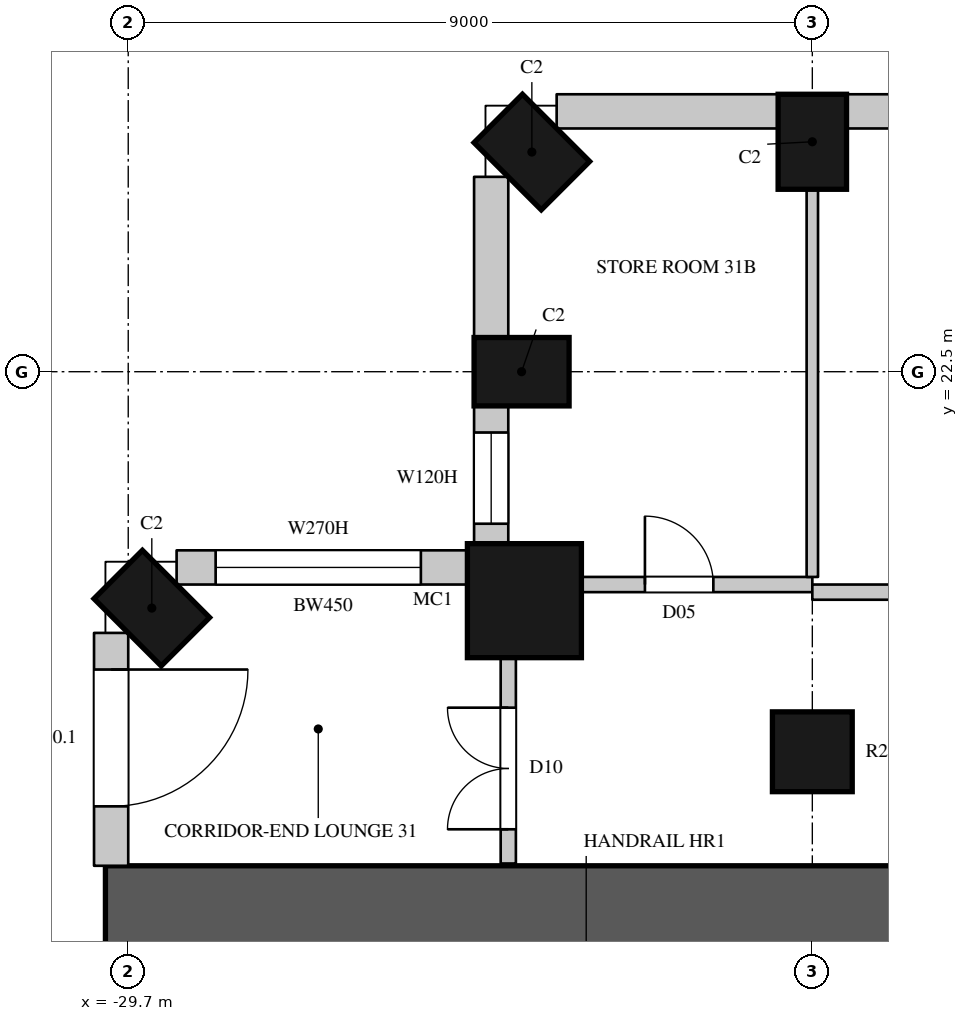
"""IFC4 building model, lengths in metres.
Left out: names, types, materials, properties, quantities, classifications, styles, units other than length and angle.
Written with IfcOpenShell. Run it as: python <this file> out.ifc"""

import sys

from ifc_helpers import new_model, si_unit, direction, frame, frame_2d, origin, origin_2d, place, context, subcontext, project, spatial, rectangle, circle, extrude, element, fill, save


model = new_model("IFC4")
c1 = context("Model", 3, precision=1e-05, world=origin(), true_north=direction((0.0, 1.0)))
c2 = subcontext(c1, "Body", "Model", "MODEL_VIEW")
j1 = project(units=[si_unit("LENGTHUNIT", "METRE"), si_unit("PLANEANGLEUNIT", "RADIAN")], contexts=[c1])
p1 = place(None, origin())
s1 = spatial("IfcSite", under=j1, at=p1, CompositionType="ELEMENT")
p2 = place(p1, origin())
s2 = spatial("IfcBuilding", under=s1, at=p2, CompositionType="ELEMENT")
p3 = place(p2, frame((0.0, 0.0, 141.9)))
s3 = spatial("IfcBuildingStorey", under=s2, at=p3, CompositionType="ELEMENT", Elevation=141.9)
for number, where, z_axis, x_axis in (
    (1, (-29.39, 19.39, 0.0), (0.0, 0.0, 1.0), (-0.707, -0.707, 0.0)),
    (2, (-20.7, 25.525, 0.0), (0.0, 0.0, 1.0), (-1.0, 0.0, 0.0)),
    (3, (-24.39, 25.39, 0.0), (0.0, 0.0, 1.0), (-0.707, -0.707, 0.0)),
    (4, (-24.525, 22.5, 0.0), (0.0, 0.0, 1.0), (0.0, -1.0, 0.0)),
):
    element("IfcColumn", number, at=place(p3, frame(where, z_axis=z_axis, x_axis=x_axis)), inside=s3, PredefinedType="COLUMN", context=c2, shape_type="SweptSolid", body=[
        extrude(rectangle(XDim=0.9, YDim=1.25, at=origin_2d()), origin(), (0.0, 0.0, 1.0), 3.6),
    ])
p4 = place(p3, frame((-24.488, 19.488, 0.0), z_axis=(0.0, 0.0, 1.0), x_axis=(1.0, 0.0, 0.0)))
e5 = element("IfcColumn", 5, at=p4, inside=s3, PredefinedType="COLUMN", context=c2, shape_type="SweptSolid", body=[
    extrude(circle(Radius=0.75, at=origin_2d()), origin(), (0.0, 0.0, 1.0), 3.6),
])
p5 = place(p3, frame((-20.7, 17.5, 0.0), z_axis=(0.0, 0.0, 1.0), x_axis=(1.0, 0.0, 0.0)))
e6 = element("IfcColumn", 6, at=p5, inside=s3, PredefinedType="COLUMN", context=c2, shape_type="SweptSolid", body=[
    extrude(circle(Radius=0.525, at=origin_2d()), origin(), (0.0, 0.0, 1.0), 3.6),
])
p6 = place(p3, frame((-29.925, 19.064, 0.0), z_axis=(0.0, 0.0, 1.0), x_axis=(0.0, -1.0, 0.0)))
e7 = element("IfcWall", 7, at=p6, inside=s3, PredefinedType="SOLIDWALL", context=c2, shape_type="SweptSolid", body=[
    extrude(rectangle(XDim=3.064, YDim=0.45, at=frame_2d((1.532, 0.0))), origin(), (0.0, 0.0, 1.0), 3.3),
])
p7 = place(p6, frame((0.482, 0.0, 0.0)))
e8 = element("IfcOpeningElement", 8, at=p7, cuts=e7, PredefinedType="OPENING", context=c2, shape_type="SweptSolid", body=[
    extrude(rectangle(XDim=1.8, YDim=2.4, at=frame_2d((0.9, 1.2))), frame((0.0, 0.235, 0.0), z_axis=(0.0, -1.0, 0.0), x_axis=(1.0, 0.0, 0.0)), (0.0, 0.0, 1.0), 0.47),
])
p8 = place(p3, frame((-12.15, 25.925, 0.0), z_axis=(0.0, 0.0, 1.0), x_axis=(-1.0, 0.0, 0.0)))
e9 = element("IfcWall", 9, at=p8, inside=s3, PredefinedType="SOLIDWALL", context=c2, shape_type="SweptSolid", body=[
    extrude(rectangle(XDim=8.1, YDim=0.45, at=frame_2d((4.05, 0.0))), origin(), (0.0, 0.0, 1.0), 3.3),
])
p9 = place(p8, frame((0.2, 0.0, 0.0)))
e10 = element("IfcOpeningElement", 10, at=p9, cuts=e9, PredefinedType="OPENING", context=c2, shape_type="SweptSolid", body=[
    extrude(rectangle(XDim=1.8, YDim=2.4, at=frame_2d((0.9, 1.2))), frame((0.0, 0.235, 0.0), z_axis=(0.0, -1.0, 0.0), x_axis=(1.0, 0.0, 0.0)), (0.0, 0.0, 1.0), 0.47),
])
p10 = place(p8, frame((2.2, 0.0, 1.05)))
e11 = element("IfcOpeningElement", 11, at=p10, cuts=e9, PredefinedType="OPENING", context=c2, shape_type="SweptSolid", body=[
    extrude(rectangle(XDim=1.2, YDim=2.0, at=frame_2d((0.6, 1.0))), frame((0.0, 0.235, 0.0), z_axis=(0.0, -1.0, 0.0), x_axis=(1.0, 0.0, 0.0)), (0.0, 0.0, 1.0), 0.47),
])
p11 = place(p8, frame((5.4, 0.0, 0.0)))
e12 = element("IfcOpeningElement", 12, at=p11, cuts=e9, PredefinedType="OPENING", context=c2, shape_type="SweptSolid", body=[
    extrude(rectangle(XDim=1.8, YDim=2.4, at=frame_2d((0.9, 1.2))), frame((0.0, 0.235, 0.0), z_axis=(0.0, -1.0, 0.0), x_axis=(1.0, 0.0, 0.0)), (0.0, 0.0, 1.0), 0.47),
])
p12 = place(p3, frame((-21.15, 25.925, 0.0), z_axis=(0.0, 0.0, 1.0), x_axis=(-1.0, 0.0, 0.0)))
e13 = element("IfcWall", 13, at=p12, inside=s3, PredefinedType="SOLIDWALL", context=c2, shape_type="SweptSolid", body=[
    extrude(rectangle(XDim=2.914, YDim=0.45, at=frame_2d((1.457, 0.0))), origin(), (0.0, 0.0, 1.0), 3.3),
])
p13 = place(p3, frame((-24.925, 25.064, 0.0), z_axis=(0.0, 0.0, 1.0), x_axis=(0.0, -1.0, 0.0)))
e14 = element("IfcWall", 14, at=p13, inside=s3, PredefinedType="SOLIDWALL", context=c2, shape_type="SweptSolid", body=[
    extrude(rectangle(XDim=2.114, YDim=0.45, at=frame_2d((1.057, 0.0))), origin(), (0.0, 0.0, 1.0), 3.3),
])
p14 = place(p3, frame((-24.925, 22.05, 0.0), z_axis=(0.0, 0.0, 1.0), x_axis=(0.0, -1.0, 0.0)))
e15 = element("IfcWall", 15, at=p14, inside=s3, PredefinedType="SOLIDWALL", context=c2, shape_type="SweptSolid", body=[
    extrude(rectangle(XDim=1.843, YDim=0.45, at=frame_2d((0.921, 0.0))), origin(), (0.0, 0.0, 1.0), 3.3),
])
p15 = place(p14, frame((0.35, 0.0, 1.05)))
e16 = element("IfcOpeningElement", 16, at=p15, cuts=e15, PredefinedType="OPENING", context=c2, shape_type="SweptSolid", body=[
    extrude(rectangle(XDim=1.2, YDim=2.0, at=frame_2d((0.6, 1.0))), frame((0.0, 0.235, 0.0), z_axis=(0.0, -1.0, 0.0), x_axis=(1.0, 0.0, 0.0)), (0.0, 0.0, 1.0), 0.47),
])
p16 = place(p3, frame((-25.207, 19.925, 0.0), z_axis=(0.0, 0.0, 1.0), x_axis=(-1.0, 0.0, 0.0)))
e17 = element("IfcWall", 17, at=p16, inside=s3, PredefinedType="SOLIDWALL", context=c2, shape_type="SweptSolid", body=[
    extrude(rectangle(XDim=3.857, YDim=0.45, at=frame_2d((1.928, 0.0))), origin(), (0.0, 0.0, 1.0), 3.3),
])
p17 = place(p16, frame((0.643, 0.0, 1.05)))
e18 = element("IfcOpeningElement", 18, at=p17, cuts=e17, PredefinedType="OPENING", context=c2, shape_type="SweptSolid", body=[
    extrude(rectangle(XDim=2.7, YDim=2.0, at=frame_2d((1.35, 1.0))), frame((0.0, 0.235, 0.0), z_axis=(0.0, -1.0, 0.0), x_axis=(1.0, 0.0, 0.0)), (0.0, 0.0, 1.0), 0.47),
])
p18 = place(p3, frame((-30.0, 15.4, 0.0), z_axis=(0.0, 0.0, 1.0), x_axis=(1.0, 0.0, 0.0)))
e19 = element("IfcWall", 19, at=p18, inside=s3, PredefinedType="SHEAR", context=c2, shape_type="SweptSolid", body=[
    extrude(rectangle(XDim=16.0, YDim=1.2, at=frame_2d((8.0, 0.0))), origin(), (0.0, 0.0, 1.0), 3.6),
])
p19 = place(p18, frame((13.4, 0.0, 0.0)))
e20 = element("IfcOpeningElement", 20, at=p19, cuts=e19, PredefinedType="OPENING", context=c2, shape_type="SweptSolid", body=[
    extrude(rectangle(XDim=1.5, YDim=2.4, at=frame_2d((0.75, 1.2))), frame((0.0, 0.61, 0.0), z_axis=(0.0, -1.0, 0.0), x_axis=(1.0, 0.0, 0.0)), (0.0, 0.0, 1.0), 1.22),
])
p20 = place(p3, frame((-24.7, 16.03, 0.0), z_axis=(0.0, 0.0, 1.0), x_axis=(0.0, 1.0, 0.0)))
e21 = element("IfcWall", 21, at=p20, inside=s3, PredefinedType="PARTITIONING", context=c2, shape_type="SweptSolid", body=[
    extrude(rectangle(XDim=2.722, YDim=0.2, at=frame_2d((1.361, 0.0))), origin(), (0.0, 0.0, 1.0), 3.3),
])
p21 = place(p20, frame((0.45, 0.0, 0.0)))
e22 = element("IfcOpeningElement", 22, at=p21, cuts=e21, PredefinedType="OPENING", context=c2, shape_type="SweptSolid", body=[
    extrude(rectangle(XDim=1.6, YDim=2.4, at=frame_2d((0.8, 1.2))), frame((0.0, 0.11, 0.0), z_axis=(0.0, -1.0, 0.0), x_axis=(1.0, 0.0, 0.0)), (0.0, 0.0, 1.0), 0.22),
])
p22 = place(p3, frame((-23.752, 19.7, 0.0), z_axis=(0.0, 0.0, 1.0), x_axis=(1.0, 0.0, 0.0)))
e23 = element("IfcWall", 23, at=p22, inside=s3, PredefinedType="PARTITIONING", context=c2, shape_type="SweptSolid", body=[
    extrude(rectangle(XDim=3.052, YDim=0.2, at=frame_2d((1.526, 0.0))), origin(), (0.0, 0.0, 1.0), 3.3),
])
p23 = place(p22, frame((0.85, 0.0, 0.0)))
e24 = element("IfcOpeningElement", 24, at=p23, cuts=e23, PredefinedType="OPENING", context=c2, shape_type="SweptSolid", body=[
    extrude(rectangle(XDim=0.9, YDim=2.2, at=frame_2d((0.45, 1.1))), frame((0.0, 0.11, 0.0), z_axis=(0.0, -1.0, 0.0), x_axis=(1.0, 0.0, 0.0)), (0.0, 0.0, 1.0), 0.22),
])
p24 = place(p3, frame((-20.7, 19.6, 0.0), z_axis=(0.0, 0.0, 1.0), x_axis=(1.0, 0.0, 0.0)))
e25 = element("IfcWall", 25, at=p24, inside=s3, PredefinedType="PARTITIONING", context=c2, shape_type="SweptSolid", body=[
    extrude(rectangle(XDim=38.214, YDim=0.2, at=frame_2d((19.107, 0.0))), origin(), (0.0, 0.0, 1.0), 3.3),
])
p25 = place(p24, frame((23.95, 0.0, 0.0)))
e26 = element("IfcOpeningElement", 26, at=p25, cuts=e25, PredefinedType="OPENING", context=c2, shape_type="SweptSolid", body=[
    extrude(rectangle(XDim=0.9, YDim=2.2, at=frame_2d((0.45, 1.1))), frame((0.0, 0.11, 0.0), z_axis=(0.0, -1.0, 0.0), x_axis=(1.0, 0.0, 0.0)), (0.0, 0.0, 1.0), 0.22),
])
p26 = place(p24, frame((2.05, 0.0, 0.0)))
e27 = element("IfcOpeningElement", 27, at=p26, cuts=e25, PredefinedType="OPENING", context=c2, shape_type="SweptSolid", body=[
    extrude(rectangle(XDim=1.1, YDim=2.4, at=frame_2d((0.55, 1.2))), frame((0.0, 0.11, 0.0), z_axis=(0.0, -1.0, 0.0), x_axis=(1.0, 0.0, 0.0)), (0.0, 0.0, 1.0), 0.22),
])
p27 = place(p24, frame((12.15, 0.0, 0.0)))
e28 = element("IfcOpeningElement", 28, at=p27, cuts=e25, PredefinedType="OPENING", context=c2, shape_type="SweptSolid", body=[
    extrude(rectangle(XDim=1.1, YDim=2.4, at=frame_2d((0.55, 1.2))), frame((0.0, 0.11, 0.0), z_axis=(0.0, -1.0, 0.0), x_axis=(1.0, 0.0, 0.0)), (0.0, 0.0, 1.0), 0.22),
])
p28 = place(p24, frame((30.2, 0.0, 0.0)))
e29 = element("IfcOpeningElement", 29, at=p28, cuts=e25, PredefinedType="OPENING", context=c2, shape_type="SweptSolid", body=[
    extrude(rectangle(XDim=0.95, YDim=2.2, at=frame_2d((0.475, 1.1))), frame((0.0, 0.11, 0.0), z_axis=(0.0, -1.0, 0.0), x_axis=(1.0, 0.0, 0.0)), (0.0, 0.0, 1.0), 0.22),
])
p29 = place(p24, frame((36.95, 0.0, 0.0)))
e30 = element("IfcOpeningElement", 30, at=p29, cuts=e25, PredefinedType="OPENING", context=c2, shape_type="SweptSolid", body=[
    extrude(rectangle(XDim=0.95, YDim=2.2, at=frame_2d((0.475, 1.1))), frame((0.0, 0.11, 0.0), z_axis=(0.0, -1.0, 0.0), x_axis=(1.0, 0.0, 0.0)), (0.0, 0.0, 1.0), 0.22),
])
p30 = place(p3, frame((-20.7, 19.8, 0.0), z_axis=(0.0, 0.0, 1.0), x_axis=(0.0, 1.0, 0.0)))
e31 = element("IfcWall", 31, at=p30, inside=s3, PredefinedType="PARTITIONING", context=c2, shape_type="SweptSolid", body=[
    extrude(rectangle(XDim=5.1, YDim=0.15, at=frame_2d((2.55, 0.0))), origin(), (0.0, 0.0, 1.0), 2.75),
])
p31 = place(p7, origin())
e32 = element("IfcDoor", 32, at=p31, inside=s3, OperationType="SLIDING_TO_LEFT", PredefinedType="DOOR", context=c2, shape_type="SweptSolid", body=[
    extrude(rectangle(XDim=1.8, YDim=2.4, at=frame_2d((0.9, 1.2))), frame((0.0, 0.13, 0.0), z_axis=(0.0, -1.0, 0.0), x_axis=(1.0, 0.0, 0.0)), (0.0, 0.0, 1.0), 0.05),
])
fill(e8, e32)
p32 = place(p15, origin())
e33 = element("IfcWindow", 33, at=p32, inside=s3, PartitioningType="SINGLE_PANEL", PredefinedType="WINDOW", context=c2, shape_type="SweptSolid", body=[
    extrude(rectangle(XDim=1.2, YDim=2.0, at=frame_2d((0.6, 1.0))), frame((0.0, 0.135, 0.0), z_axis=(0.0, -1.0, 0.0), x_axis=(1.0, 0.0, 0.0)), (0.0, 0.0, 1.0), 0.06),
])
fill(e16, e33)
p33 = place(p17, origin())
e34 = element("IfcWindow", 34, at=p33, inside=s3, PartitioningType="SINGLE_PANEL", PredefinedType="WINDOW", context=c2, shape_type="SweptSolid", body=[
    extrude(rectangle(XDim=2.7, YDim=2.0, at=frame_2d((1.35, 1.0))), frame((0.0, 0.135, 0.0), z_axis=(0.0, -1.0, 0.0), x_axis=(1.0, 0.0, 0.0)), (0.0, 0.0, 1.0), 0.06),
])
fill(e18, e34)
p34 = place(p23, origin())
e35 = element("IfcDoor", 35, at=p34, inside=s3, OperationType="SINGLE_SWING_LEFT", PredefinedType="DOOR", context=c2, shape_type="SweptSolid", body=[
    extrude(rectangle(XDim=0.9, YDim=2.2, at=frame_2d((0.45, 1.1))), frame((0.0, 0.025, 0.0), z_axis=(0.0, -1.0, 0.0), x_axis=(1.0, 0.0, 0.0)), (0.0, 0.0, 1.0), 0.05),
])
fill(e24, e35)
p35 = place(p21, origin())
e36 = element("IfcDoor", 36, at=p35, inside=s3, OperationType="DOUBLE_DOOR_SINGLE_SWING", PredefinedType="DOOR", context=c2, shape_type="SweptSolid", body=[
    extrude(rectangle(XDim=1.6, YDim=2.4, at=frame_2d((0.8, 1.2))), frame((0.0, 0.025, 0.0), z_axis=(0.0, -1.0, 0.0), x_axis=(1.0, 0.0, 0.0)), (0.0, 0.0, 1.0), 0.05),
])
fill(e22, e36)
save(model, sys.argv[1])
